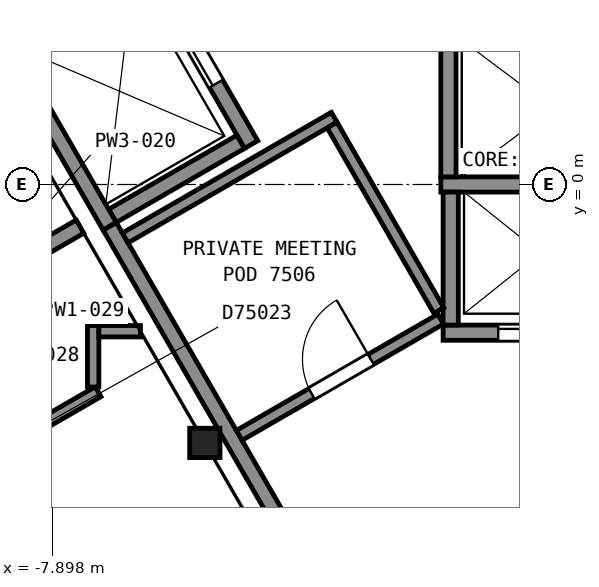
"""IFC4 building model, lengths in metres.
Left out: names, types, materials, properties, quantities, classifications, styles, units other than length and angle.
Written with IfcOpenShell. Run it as: python <this file> out.ifc"""

import sys

from ifc_helpers import new_model, si_unit, direction, frame, frame_2d, origin, origin_2d, place, context, subcontext, project, spatial, rectangle, i_section, extrude, element, fill, save


model = new_model("IFC4")
c1 = context("Model", 3, precision=1e-05, world=origin(), true_north=direction((0.0, 1.0)))
c2 = subcontext(c1, "Body", "Model", "MODEL_VIEW")
j1 = project(units=[si_unit("LENGTHUNIT", "METRE"), si_unit("PLANEANGLEUNIT", "RADIAN")], contexts=[c1])
p1 = place(None, origin())
s1 = spatial("IfcSite", under=j1, at=p1, CompositionType="ELEMENT")
p2 = place(p1, origin())
s2 = spatial("IfcBuilding", under=s1, at=p2, CompositionType="ELEMENT")
p3 = place(p2, frame((0.0, 0.0, 297.3)))
s3 = spatial("IfcBuildingStorey", under=s2, at=p3, CompositionType="ELEMENT", Elevation=297.3)
p4 = place(p3, frame((-5.89, -3.4, 0.0), z_axis=(0.0, 0.0, 1.0), x_axis=(1.0, 0.0, 0.0)))
e1 = element("IfcColumn", 1, at=p4, inside=s3, PredefinedType="COLUMN", context=c2, shape_type="SweptSolid", body=[
    extrude(i_section(OverallWidth=0.399, OverallDepth=0.386, WebThickness=0.021, FlangeThickness=0.033, FilletRadius=0.015, at=origin_2d()), origin(), (0.0, 0.0, 1.0), 3.7),
])
p5 = place(p3, frame((-2.755, -1.95, 0.0), z_axis=(0.0, 0.0, 1.0), x_axis=(1.0, 0.0, 0.0)))
e2 = element("IfcWall", 2, at=p5, inside=s3, PredefinedType="PARTITIONING", context=c2, shape_type="SweptSolid", body=[
    extrude(rectangle(XDim=2.55, YDim=0.2, at=frame_2d((1.275, 0.0))), origin(), (0.0, 0.0, 1.0), 3.7),
])
p6 = place(p5, frame((0.725, 0.0, 0.0)))
e3 = element("IfcOpeningElement", 3, at=p6, cuts=e2, PredefinedType="OPENING", context=c2, shape_type="SweptSolid", body=[
    extrude(rectangle(XDim=1.1, YDim=2.1, at=frame_2d((0.55, 1.05))), frame((0.0, 0.11, 0.0), z_axis=(0.0, -1.0, 0.0), x_axis=(1.0, 0.0, 0.0)), (0.0, 0.0, 1.0), 0.22),
])
p7 = place(p3, frame((-2.785, 0.0, 0.0), z_axis=(0.0, 0.0, 1.0), x_axis=(1.0, 0.0, 0.0)))
e4 = element("IfcWall", 4, at=p7, inside=s3, PredefinedType="PARTITIONING", context=c2, shape_type="SweptSolid", body=[
    extrude(rectangle(XDim=2.95, YDim=0.2, at=frame_2d((1.475, 0.0))), origin(), (0.0, 0.0, 1.0), 3.7),
])
p8 = place(p3, frame((-7.105, -0.413, 0.0), z_axis=(0.0, 0.0, 1.0), x_axis=(0.866000020948, 0.500043961785, 0.0)))
e5 = element("IfcWall", 5, at=p8, inside=s3, PredefinedType="PARTITIONING", context=c2, shape_type="SweptSolid", body=[
    extrude(rectangle(XDim=1.95, YDim=0.2, at=frame_2d((0.975, 0.0))), origin(), (0.0, 0.0, 1.0), 3.7),
])
p9 = place(p3, frame((-2.655, -1.85, 0.0), z_axis=(0.0, 0.0, 1.0), x_axis=(0.0, 1.0, 0.0)))
e6 = element("IfcWall", 6, at=p9, inside=s3, PredefinedType="PARTITIONING", context=c2, shape_type="SweptSolid", body=[
    extrude(rectangle(XDim=1.75, YDim=0.2, at=frame_2d((0.875, 0.0))), origin(), (0.0, 0.0, 1.0), 3.7),
])
p10 = place(p3, frame((-2.685, 0.1, 0.0), z_axis=(0.0, 0.0, 1.0), x_axis=(0.0, 1.0, 0.0)))
e7 = element("IfcWall", 7, at=p10, inside=s3, PredefinedType="PARTITIONING", context=c2, shape_type="SweptSolid", body=[
    extrude(rectangle(XDim=1.95, YDim=0.2, at=frame_2d((0.975, 0.0))), origin(), (0.0, 0.0, 1.0), 3.7),
])
p11 = place(p3, frame((-5.28, 0.525, 0.0), z_axis=(0.0, 0.0, 1.0), x_axis=(-0.500037662692, 0.866003658127, 0.0)))
e8 = element("IfcWall", 8, at=p11, inside=s3, PredefinedType="PARTITIONING", context=c2, shape_type="SweptSolid", body=[
    extrude(rectangle(XDim=2.95, YDim=0.2, at=frame_2d((1.475, 0.0))), origin(), (0.0, 0.0, 1.0), 3.7),
])
p12 = place(p11, frame((0.925, 0.0, 0.0)))
e9 = element("IfcOpeningElement", 9, at=p12, cuts=e8, PredefinedType="OPENING", context=c2, shape_type="SweptSolid", body=[
    extrude(rectangle(XDim=1.1, YDim=2.1, at=frame_2d((0.55, 1.05))), frame((0.0, 0.11, 0.0), z_axis=(0.0, -1.0, 0.0), x_axis=(1.0, 0.0, 0.0)), (0.0, 0.0, 1.0), 0.22),
])
p13 = place(p3, frame((-7.142, -0.55, 0.0), z_axis=(0.0, 0.0, 1.0), x_axis=(-0.49997559174, 0.866039495442, 0.0)))
e10 = element("IfcWall", 10, at=p13, inside=s3, PredefinedType="PARTITIONING", context=c2, shape_type="SweptSolid", body=[
    extrude(rectangle(XDim=2.95, YDim=0.2, at=frame_2d((1.475, 0.0))), origin(), (0.0, 0.0, 1.0), 3.7),
])
p14 = place(p3, frame((-7.141, -0.551, 0.0), z_axis=(0.0, 0.0, 1.0), x_axis=(0.500001302854, -0.86602465158, 0.0)))
e11 = element("IfcWall", 11, at=p14, inside=s3, PredefinedType="PARTITIONING", context=c2, shape_type="SweptSolid", body=[
    extrude(rectangle(XDim=6.846, YDim=0.2, at=frame_2d((3.423, 0.0))), origin(), (0.0, 0.0, 1.0), 3.45),
])
p15 = place(p14, frame((4.983, 0.0, 0.0)))
e12 = element("IfcOpeningElement", 12, at=p15, cuts=e11, PredefinedType="OPENING", context=c2, shape_type="SweptSolid", body=[
    extrude(rectangle(XDim=1.2, YDim=2.1, at=frame_2d((0.6, 1.05))), frame((0.0, 0.11, 0.0), z_axis=(0.0, -1.0, 0.0), x_axis=(1.0, 0.0, 0.0)), (0.0, 0.0, 1.0), 0.22),
])
p16 = place(p3, frame((-6.938, -0.703, 0.0), z_axis=(0.0, 0.0, 1.0), x_axis=(0.866029357279, 0.499993152284, 0.0)))
e13 = element("IfcWall", 13, at=p16, inside=s3, PredefinedType="PARTITIONING", context=c2, shape_type="SweptSolid", body=[
    extrude(rectangle(XDim=3.175, YDim=0.15, at=frame_2d((1.587, 0.0))), origin(), (0.0, 0.0, 1.0), 3.45),
])
p17 = place(p3, frame((-5.438, -3.301, 0.0), z_axis=(0.0, 0.0, 1.0), x_axis=(0.865961047596, 0.500111451624, 0.0)))
e14 = element("IfcWall", 14, at=p17, inside=s3, PredefinedType="PARTITIONING", context=c2, shape_type="SweptSolid", body=[
    extrude(rectangle(XDim=3.06, YDim=0.15, at=frame_2d((1.53, 0.0))), origin(), (0.0, 0.0, 1.0), 3.45),
])
p18 = place(p17, frame((1.1, 0.0, 0.0)))
e15 = element("IfcOpeningElement", 15, at=p18, cuts=e14, PredefinedType="OPENING", context=c2, shape_type="SweptSolid", body=[
    extrude(rectangle(XDim=0.9, YDim=2.1, at=frame_2d((0.45, 1.05))), frame((0.0, 0.085, 0.0), z_axis=(0.0, -1.0, 0.0), x_axis=(1.0, 0.0, 0.0)), (0.0, 0.0, 1.0), 0.17),
])
p19 = place(p3, frame((-4.216, 0.782, 0.0), z_axis=(0.0, 0.0, 1.0), x_axis=(0.498733469436, -0.866755401751, 0.0)))
e16 = element("IfcWall", 16, at=p19, inside=s3, PredefinedType="PARTITIONING", context=c2, shape_type="SweptSolid", body=[
    extrude(rectangle(XDim=2.815, YDim=0.15, at=frame_2d((1.407, 0.0))), origin(), (0.0, 0.0, 1.0), 3.45),
])
p20 = place(p3, frame((-12.205, -5.562, 0.0), z_axis=(0.0, 0.0, 1.0), x_axis=(0.866006351856, 0.500032997455, 0.0)))
e17 = element("IfcWall", 17, at=p20, inside=s3, PredefinedType="PARTITIONING", context=c2, shape_type="SweptSolid", body=[
    extrude(rectangle(XDim=5.671, YDim=0.15, at=frame_2d((2.835, 0.0))), origin(), (0.0, 0.0, 1.0), 2.723),
])
p21 = place(p20, frame((2.935, 0.0, 0.0)))
e18 = element("IfcOpeningElement", 18, at=p21, cuts=e17, PredefinedType="OPENING", context=c2, shape_type="SweptSolid", body=[
    extrude(rectangle(XDim=1.0, YDim=2.1, at=frame_2d((0.5, 1.05))), frame((0.0, 0.085, 0.0), z_axis=(0.0, -1.0, 0.0), x_axis=(1.0, 0.0, 0.0)), (0.0, 0.0, 1.0), 0.17),
])
p22 = place(p3, frame((-10.346, -2.179, 0.0), z_axis=(0.0, 0.0, 1.0), x_axis=(0.86595908408, 0.500114851509, 0.0)))
e19 = element("IfcWall", 19, at=p22, inside=s3, PredefinedType="PARTITIONING", context=c2, shape_type="SweptSolid", body=[
    extrude(rectangle(XDim=3.249, YDim=0.2, at=frame_2d((1.625, 0.0))), origin(), (0.0, 0.0, 1.0), 2.723),
])
p23 = place(p3, frame((-7.359, -2.664, 0.0), z_axis=(0.0, 0.0, 1.0), x_axis=(0.0, 1.0, 0.0)))
e20 = element("IfcWall", 20, at=p23, inside=s3, PredefinedType="PARTITIONING", context=c2, shape_type="SweptSolid", body=[
    extrude(rectangle(XDim=0.808, YDim=0.15, at=frame_2d((0.404, 0.0))), origin(), (0.0, 0.0, 1.0), 2.723),
])
p24 = place(p3, frame((-7.284, -1.931, 0.0), z_axis=(0.0, 0.0, 1.0), x_axis=(1.0, 0.0, 0.0)))
e21 = element("IfcWall", 21, at=p24, inside=s3, PredefinedType="PARTITIONING", context=c2, shape_type="SweptSolid", body=[
    extrude(rectangle(XDim=0.547, YDim=0.15, at=frame_2d((0.273, 0.0))), origin(), (0.0, 0.0, 1.0), 2.723),
])
p25 = place(p6, origin())
e22 = element("IfcDoor", 22, at=p25, inside=s3, OperationType="SLIDING_TO_RIGHT", PredefinedType="DOOR", context=c2, shape_type="SweptSolid", body=[
    extrude(rectangle(XDim=1.1, YDim=2.1, at=frame_2d((0.55, 1.05))), frame((0.0, 0.025, 0.0), z_axis=(0.0, -1.0, 0.0), x_axis=(1.0, 0.0, 0.0)), (0.0, 0.0, 1.0), 0.05),
])
fill(e3, e22)
p26 = place(p12, origin())
e23 = element("IfcDoor", 23, at=p26, inside=s3, OperationType="SLIDING_TO_LEFT", PredefinedType="DOOR", context=c2, shape_type="SweptSolid", body=[
    extrude(rectangle(XDim=1.1, YDim=2.1, at=frame_2d((0.55, 1.05))), frame((0.0, 0.025, 0.0), z_axis=(0.0, -1.0, 0.0), x_axis=(1.0, 0.0, 0.0)), (0.0, 0.0, 1.0), 0.05),
])
fill(e9, e23)
p27 = place(p18, origin())
e24 = element("IfcDoor", 24, at=p27, inside=s3, OperationType="SINGLE_SWING_RIGHT", PredefinedType="DOOR", context=c2, shape_type="SweptSolid", body=[
    extrude(rectangle(XDim=0.9, YDim=2.1, at=frame_2d((0.45, 1.05))), frame((0.0, 0.025, 0.0), z_axis=(0.0, -1.0, 0.0), x_axis=(1.0, 0.0, 0.0)), (0.0, 0.0, 1.0), 0.05),
])
fill(e15, e24)
save(model, sys.argv[1])
